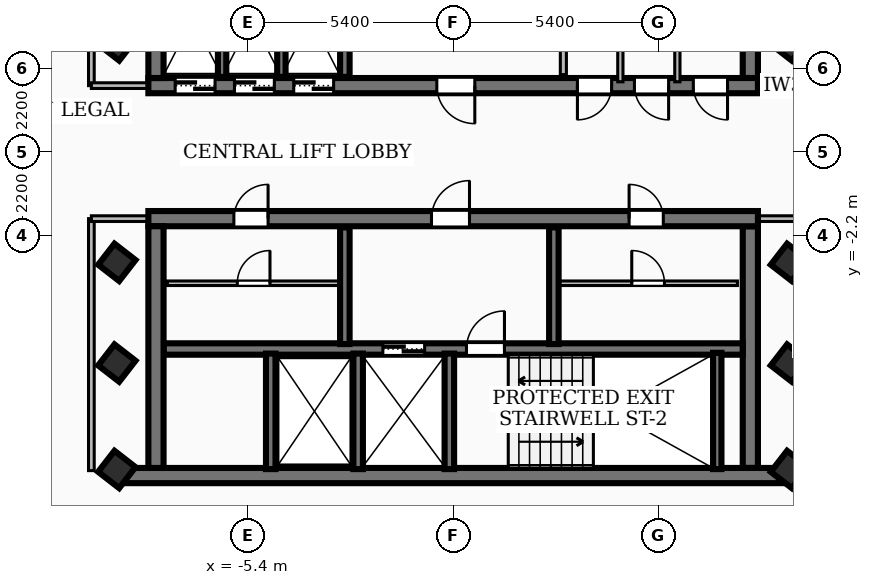
"""IFC4 building model, lengths in metres.
Left out: names, types, materials, properties, quantities, classifications, styles, units other than length and angle.
Written with IfcOpenShell. Run it as: python <this file> out.ifc"""

import sys

from ifc_helpers import new_model, si_unit, direction, frame, frame_2d, origin, origin_2d, place, context, subcontext, project, spatial, rectangle, extrude, element, fill, save


model = new_model("IFC4")
c1 = context("Model", 3, precision=1e-05, world=origin(), true_north=direction((0.0, 1.0)))
c2 = subcontext(c1, "Body", "Model", "MODEL_VIEW")
j1 = project(units=[si_unit("LENGTHUNIT", "METRE"), si_unit("PLANEANGLEUNIT", "RADIAN")], contexts=[c1])
p1 = place(None, origin())
s1 = spatial("IfcSite", under=j1, at=p1, CompositionType="ELEMENT")
p2 = place(p1, origin())
s2 = spatial("IfcBuilding", under=s1, at=p2, CompositionType="ELEMENT")
p3 = place(p2, frame((0.0, 0.0, 261.18)))
s3 = spatial("IfcBuildingStorey", under=s2, at=p3, CompositionType="ELEMENT", Elevation=261.18)
p4 = place(p3, frame((8.02, 1.75, 0.0), z_axis=(0.0, 0.0, 1.0), x_axis=(-1.0, 0.0, 0.0)))
e1 = element("IfcWall", 1, at=p4, inside=s3, PredefinedType="SHEAR", context=c2, shape_type="SweptSolid", body=[
    extrude(rectangle(XDim=16.04, YDim=0.4, at=frame_2d((8.02, 0.0))), origin(), (0.0, 0.0, 1.0), 3.16),
])
p5 = place(p4, frame((7.45, 0.0, 0.0)))
e2 = element("IfcOpeningElement", 2, at=p5, cuts=e1, PredefinedType="OPENING", context=c2, shape_type="SweptSolid", body=[
    extrude(rectangle(XDim=1.0, YDim=2.1, at=frame_2d((0.5, 1.05))), frame((0.0, 0.21, 0.0), z_axis=(0.0, -1.0, 0.0), x_axis=(1.0, 0.0, 0.0)), (0.0, 0.0, 1.0), 0.42),
])
p6 = place(p4, frame((14.285, 0.0, 0.0)))
e3 = element("IfcOpeningElement", 3, at=p6, cuts=e1, PredefinedType="OPENING", context=c2, shape_type="SweptSolid", body=[
    extrude(rectangle(XDim=1.05, YDim=2.15, at=frame_2d((0.525, 1.075))), frame((0.0, 0.21, 0.0), z_axis=(0.0, -1.0, 0.0), x_axis=(1.0, 0.0, 0.0)), (0.0, 0.0, 1.0), 0.42),
])
p7 = place(p4, frame((12.725, 0.0, 0.0)))
e4 = element("IfcOpeningElement", 4, at=p7, cuts=e1, PredefinedType="OPENING", context=c2, shape_type="SweptSolid", body=[
    extrude(rectangle(XDim=1.05, YDim=2.15, at=frame_2d((0.525, 1.075))), frame((0.0, 0.21, 0.0), z_axis=(0.0, -1.0, 0.0), x_axis=(1.0, 0.0, 0.0)), (0.0, 0.0, 1.0), 0.42),
])
p8 = place(p4, frame((11.165, 0.0, 0.0)))
e5 = element("IfcOpeningElement", 5, at=p8, cuts=e1, PredefinedType="OPENING", context=c2, shape_type="SweptSolid", body=[
    extrude(rectangle(XDim=1.05, YDim=2.15, at=frame_2d((0.525, 1.075))), frame((0.0, 0.21, 0.0), z_axis=(0.0, -1.0, 0.0), x_axis=(1.0, 0.0, 0.0)), (0.0, 0.0, 1.0), 0.42),
])
p9 = place(p4, frame((3.85, 0.0, 0.0)))
e6 = element("IfcOpeningElement", 6, at=p9, cuts=e1, PredefinedType="OPENING", context=c2, shape_type="SweptSolid", body=[
    extrude(rectangle(XDim=0.9, YDim=2.06, at=frame_2d((0.45, 1.03))), frame((0.0, 0.21, 0.0), z_axis=(0.0, -1.0, 0.0), x_axis=(1.0, 0.0, 0.0)), (0.0, 0.0, 1.0), 0.42),
])
p10 = place(p4, frame((2.35, 0.0, 0.0)))
e7 = element("IfcOpeningElement", 7, at=p10, cuts=e1, PredefinedType="OPENING", context=c2, shape_type="SweptSolid", body=[
    extrude(rectangle(XDim=0.9, YDim=2.06, at=frame_2d((0.45, 1.03))), frame((0.0, 0.21, 0.0), z_axis=(0.0, -1.0, 0.0), x_axis=(1.0, 0.0, 0.0)), (0.0, 0.0, 1.0), 0.42),
])
p11 = place(p4, frame((0.8, 0.0, 0.0)))
e8 = element("IfcOpeningElement", 8, at=p11, cuts=e1, PredefinedType="OPENING", context=c2, shape_type="SweptSolid", body=[
    extrude(rectangle(XDim=0.9, YDim=2.06, at=frame_2d((0.45, 1.03))), frame((0.0, 0.21, 0.0), z_axis=(0.0, -1.0, 0.0), x_axis=(1.0, 0.0, 0.0)), (0.0, 0.0, 1.0), 0.42),
])
for number, where, z_axis, x_axis in (
    (9, (-7.82, 1.95, 0.0), (0.0, 0.0, 1.0), (0.0, 1.0, 0.0)),
    (10, (7.82, 8.31, 0.0), (0.0, 0.0, 1.0), (0.0, -1.0, 0.0)),
):
    element("IfcWall", number, at=place(p3, frame(where, z_axis=z_axis, x_axis=x_axis)), inside=s3, PredefinedType="SHEAR", context=c2, shape_type="SweptSolid", body=[
        extrude(rectangle(XDim=6.36, YDim=0.4, at=frame_2d((3.18, 0.0))), origin(), (0.0, 0.0, 1.0), 3.16),
    ])
p12 = place(p3, frame((8.78, -8.51, 0.0), z_axis=(0.0, 0.0, 1.0), x_axis=(-1.0, 0.0, 0.0)))
e11 = element("IfcWall", 11, at=p12, inside=s3, PredefinedType="SHEAR", context=c2, shape_type="SweptSolid", body=[
    extrude(rectangle(XDim=17.56, YDim=0.4, at=frame_2d((8.78, 0.0))), origin(), (0.0, 0.0, 1.0), 3.16),
])
p13 = place(p3, frame((-8.02, -1.75, 0.0), z_axis=(0.0, 0.0, 1.0), x_axis=(1.0, 0.0, 0.0)))
e12 = element("IfcWall", 12, at=p13, inside=s3, PredefinedType="SHEAR", context=c2, shape_type="SweptSolid", body=[
    extrude(rectangle(XDim=16.04, YDim=0.4, at=frame_2d((8.02, 0.0))), origin(), (0.0, 0.0, 1.0), 3.16),
])
p14 = place(p13, frame((7.45, 0.0, 0.0)))
e13 = element("IfcOpeningElement", 13, at=p14, cuts=e12, PredefinedType="OPENING", context=c2, shape_type="SweptSolid", body=[
    extrude(rectangle(XDim=1.0, YDim=2.1, at=frame_2d((0.5, 1.05))), frame((0.0, 0.21, 0.0), z_axis=(0.0, -1.0, 0.0), x_axis=(1.0, 0.0, 0.0)), (0.0, 0.0, 1.0), 0.42),
])
p15 = place(p13, frame((12.65, 0.0, 0.0)))
e14 = element("IfcOpeningElement", 14, at=p15, cuts=e12, PredefinedType="OPENING", context=c2, shape_type="SweptSolid", body=[
    extrude(rectangle(XDim=0.9, YDim=2.06, at=frame_2d((0.45, 1.03))), frame((0.0, 0.21, 0.0), z_axis=(0.0, -1.0, 0.0), x_axis=(1.0, 0.0, 0.0)), (0.0, 0.0, 1.0), 0.42),
])
p16 = place(p13, frame((2.25, 0.0, 0.0)))
e15 = element("IfcOpeningElement", 15, at=p16, cuts=e12, PredefinedType="OPENING", context=c2, shape_type="SweptSolid", body=[
    extrude(rectangle(XDim=0.9, YDim=2.06, at=frame_2d((0.45, 1.03))), frame((0.0, 0.21, 0.0), z_axis=(0.0, -1.0, 0.0), x_axis=(1.0, 0.0, 0.0)), (0.0, 0.0, 1.0), 0.42),
])
for number, where, z_axis, x_axis in (
    (16, (-7.82, -8.31, 0.0), (0.0, 0.0, 1.0), (0.0, 1.0, 0.0)),
    (17, (7.82, -1.95, 0.0), (0.0, 0.0, 1.0), (0.0, -1.0, 0.0)),
):
    element("IfcWall", number, at=place(p3, frame(where, z_axis=z_axis, x_axis=x_axis)), inside=s3, PredefinedType="SHEAR", context=c2, shape_type="SweptSolid", body=[
        extrude(rectangle(XDim=6.36, YDim=0.4, at=frame_2d((3.18, 0.0))), origin(), (0.0, 0.0, 1.0), 3.16),
    ])
p17 = place(p3, frame((-7.62, -5.18, 0.0), z_axis=(0.0, 0.0, 1.0), x_axis=(1.0, 0.0, 0.0)))
e18 = element("IfcWall", 18, at=p17, inside=s3, PredefinedType="SOLIDWALL", context=c2, shape_type="SweptSolid", body=[
    extrude(rectangle(XDim=15.24, YDim=0.3, at=frame_2d((7.62, 0.0))), origin(), (0.0, 0.0, 1.0), 3.16),
])
p18 = place(p17, frame((5.77, 0.0, 0.0)))
e19 = element("IfcOpeningElement", 19, at=p18, cuts=e18, PredefinedType="OPENING", context=c2, shape_type="SweptSolid", body=[
    extrude(rectangle(XDim=1.1, YDim=2.15, at=frame_2d((0.55, 1.075))), frame((0.0, 0.16, 0.0), z_axis=(0.0, -1.0, 0.0), x_axis=(1.0, 0.0, 0.0)), (0.0, 0.0, 1.0), 0.32),
])
p19 = place(p17, frame((7.97, 0.0, 0.0)))
e20 = element("IfcOpeningElement", 20, at=p19, cuts=e18, PredefinedType="OPENING", context=c2, shape_type="SweptSolid", body=[
    extrude(rectangle(XDim=1.0, YDim=2.1, at=frame_2d((0.5, 1.05))), frame((0.0, 0.16, 0.0), z_axis=(0.0, -1.0, 0.0), x_axis=(1.0, 0.0, 0.0)), (0.0, 0.0, 1.0), 0.32),
])
p20 = place(p3, frame((6.95, -8.34, 0.0), z_axis=(0.0, 0.0, 1.0), x_axis=(0.0, 1.0, 0.0)))
e21 = element("IfcWall", 21, at=p20, inside=s3, PredefinedType="SOLIDWALL", context=c2, shape_type="SweptSolid", body=[
    extrude(rectangle(XDim=3.06, YDim=0.22, at=frame_2d((1.53, 0.0))), origin(), (0.0, 0.0, 1.0), 3.16),
])
p21 = place(p3, frame((-2.85, 1.98, 0.0), z_axis=(0.0, 0.0, 1.0), x_axis=(0.0, 1.0, 0.0)))
e22 = element("IfcWall", 22, at=p21, inside=s3, PredefinedType="SOLIDWALL", context=c2, shape_type="SweptSolid", body=[
    extrude(rectangle(XDim=3.07, YDim=0.25, at=frame_2d((1.535, 0.0))), origin(), (0.0, 0.0, 1.0), 3.16),
])
for number, where, z_axis, x_axis in (
    (23, (-0.1, -8.34, 0.0), (0.0, 0.0, 1.0), (0.0, 1.0, 0.0)),
    (24, (-2.5, -8.34, 0.0), (0.0, 0.0, 1.0), (0.0, 1.0, 0.0)),
    (25, (-4.8, -8.34, 0.0), (0.0, 0.0, 1.0), (0.0, 1.0, 0.0)),
):
    element("IfcWall", number, at=place(p3, frame(where, z_axis=z_axis, x_axis=x_axis)), inside=s3, PredefinedType="SOLIDWALL", context=c2, shape_type="SweptSolid", body=[
        extrude(rectangle(XDim=3.04, YDim=0.25, at=frame_2d((1.52, 0.0))), origin(), (0.0, 0.0, 1.0), 3.16),
    ])
for number, where, z_axis, x_axis in (
    (26, (-2.85, -5.05, 0.0), (0.0, 0.0, 1.0), (0.0, 1.0, 0.0)),
    (27, (2.65, -5.05, 0.0), (0.0, 0.0, 1.0), (0.0, 1.0, 0.0)),
):
    element("IfcWall", number, at=place(p3, frame(where, z_axis=z_axis, x_axis=x_axis)), inside=s3, PredefinedType="SOLIDWALL", context=c2, shape_type="SweptSolid", body=[
        extrude(rectangle(XDim=3.07, YDim=0.25, at=frame_2d((1.535, 0.0))), origin(), (0.0, 0.0, 1.0), 3.16),
    ])
for number, where, z_axis, x_axis in (
    (28, (-6.08, 1.98, 0.0), (0.0, 0.0, 1.0), (0.0, 1.0, 0.0)),
    (29, (-4.52, 1.98, 0.0), (0.0, 0.0, 1.0), (0.0, 1.0, 0.0)),
):
    element("IfcWall", number, at=place(p3, frame(where, z_axis=z_axis, x_axis=x_axis)), inside=s3, PredefinedType="SOLIDWALL", context=c2, shape_type="SweptSolid", body=[
        extrude(rectangle(XDim=3.07, YDim=0.22, at=frame_2d((1.535, 0.0))), origin(), (0.0, 0.0, 1.0), 3.16),
    ])
for number, where, z_axis, x_axis in (
    (30, (-8.85, -5.55, 0.0), (0.0, 0.0, 1.0), (0.613, 0.79, 0.0)),
    (31, (-8.85, -2.9, 0.0), (0.0, 0.0, 1.0), (0.613, 0.79, 0.0)),
    (32, (-8.85, 2.9, 0.0), (0.0, 0.0, 1.0), (0.613, 0.79, 0.0)),
    (33, (8.85, -5.55, 0.0), (0.0, 0.0, 1.0), (0.613, 0.79, 0.0)),
    (34, (8.85, -2.9, 0.0), (0.0, 0.0, 1.0), (0.613, 0.79, 0.0)),
    (35, (8.85, 2.9, 0.0), (0.0, 0.0, 1.0), (0.613, 0.79, 0.0)),
    (36, (8.85, -8.35, 0.0), (0.0, 0.0, 1.0), (0.613, 0.79, 0.0)),
    (37, (-8.85, -8.35, 0.0), (0.0, 0.0, 1.0), (0.613, 0.79, 0.0)),
):
    element("IfcColumn", number, at=place(p3, frame(where, z_axis=z_axis, x_axis=x_axis)), inside=s3, PredefinedType="COLUMN", context=c2, shape_type="SweptSolid", body=[
        extrude(rectangle(XDim=0.7, YDim=0.7, at=origin_2d()), origin(), (0.0, 0.0, 1.0), 3.42),
    ])
p22 = place(p3, frame((1.386, -19.362, 0.0), z_axis=(0.0, 0.0, 1.0), x_axis=(-0.790191227086, 0.612860363081, 0.0)))
e38 = element("IfcWall", 38, at=p22, inside=s3, PredefinedType="SOLIDWALL", context=c2, shape_type="SweptSolid", body=[
    extrude(rectangle(XDim=25.924, YDim=0.2, at=frame_2d((12.962, 0.0))), origin(), (0.0, 0.0, 1.0), 3.16),
])
p23 = place(p22, frame((19.021, 0.0, 0.85)))
e39 = element("IfcOpeningElement", 39, at=p23, cuts=e38, PredefinedType="OPENING", context=c2, shape_type="SweptSolid", body=[
    extrude(rectangle(XDim=2.4, YDim=1.85, at=frame_2d((1.2, 0.925))), frame((0.0, 0.11, 0.0), z_axis=(0.0, -1.0, 0.0), x_axis=(1.0, 0.0, 0.0)), (0.0, 0.0, 1.0), 0.22),
])
p24 = place(p3, frame((2.9, 2.04, 0.0), z_axis=(0.0, 0.0, 1.0), x_axis=(0.0, 1.0, 0.0)))
e40 = element("IfcWall", 40, at=p24, inside=s3, PredefinedType="PARTITIONING", context=c2, shape_type="SweptSolid", body=[
    extrude(rectangle(XDim=2.94, YDim=0.16, at=frame_2d((1.47, 0.0))), origin(), (0.0, 0.0, 1.0), 2.39),
])
p25 = place(p24, frame((1.82, 0.0, 0.0)))
e41 = element("IfcOpeningElement", 41, at=p25, cuts=e40, PredefinedType="OPENING", context=c2, shape_type="SweptSolid", body=[
    extrude(rectangle(XDim=0.9, YDim=2.06, at=frame_2d((0.45, 1.03))), frame((0.0, 0.09, 0.0), z_axis=(0.0, -1.0, 0.0), x_axis=(1.0, 0.0, 0.0)), (0.0, 0.0, 1.0), 0.18),
])
p26 = place(p3, frame((2.8, -3.45, 0.0), z_axis=(0.0, 0.0, 1.0), x_axis=(1.0, 0.0, 0.0)))
e42 = element("IfcWall", 42, at=p26, inside=s3, PredefinedType="PARTITIONING", context=c2, shape_type="SweptSolid", body=[
    extrude(rectangle(XDim=4.68, YDim=0.12, at=frame_2d((2.34, 0.0))), origin(), (0.0, 0.0, 1.0), 3.16),
])
p27 = place(p26, frame((1.9, 0.0, 0.0)))
e43 = element("IfcOpeningElement", 43, at=p27, cuts=e42, PredefinedType="OPENING", context=c2, shape_type="SweptSolid", body=[
    extrude(rectangle(XDim=0.86, YDim=2.04, at=frame_2d((0.43, 1.02))), frame((0.0, 0.07, 0.0), z_axis=(0.0, -1.0, 0.0), x_axis=(1.0, 0.0, 0.0)), (0.0, 0.0, 1.0), 0.14),
])
p28 = place(p3, frame((-7.52, -3.45, 0.0), z_axis=(0.0, 0.0, 1.0), x_axis=(1.0, 0.0, 0.0)))
e44 = element("IfcWall", 44, at=p28, inside=s3, PredefinedType="PARTITIONING", context=c2, shape_type="SweptSolid", body=[
    extrude(rectangle(XDim=4.54, YDim=0.12, at=frame_2d((2.27, 0.0))), origin(), (0.0, 0.0, 1.0), 3.16),
])
p29 = place(p28, frame((1.84, 0.0, 0.0)))
e45 = element("IfcOpeningElement", 45, at=p29, cuts=e44, PredefinedType="OPENING", context=c2, shape_type="SweptSolid", body=[
    extrude(rectangle(XDim=0.86, YDim=2.04, at=frame_2d((0.43, 1.02))), frame((0.0, 0.07, 0.0), z_axis=(0.0, -1.0, 0.0), x_axis=(1.0, 0.0, 0.0)), (0.0, 0.0, 1.0), 0.14),
])
for number, where, z_axis, x_axis in (
    (46, (4.4, 1.85, 0.0), (0.0, 0.0, 1.0), (0.0, 1.0, 0.0)),
    (47, (5.9, 1.85, 0.0), (0.0, 0.0, 1.0), (0.0, 1.0, 0.0)),
):
    element("IfcWall", number, at=place(p3, frame(where, z_axis=z_axis, x_axis=x_axis)), inside=s3, PredefinedType="PARTITIONING", context=c2, shape_type="SweptSolid", body=[
        extrude(rectangle(XDim=1.89, YDim=0.138, at=frame_2d((0.945, 0.0))), origin(), (0.0, 0.0, 1.0), 2.39),
    ])
p30 = place(p3, frame((-9.52, 1.75, 0.0), z_axis=(0.0, 0.0, 1.0), x_axis=(0.0, 1.0, 0.0)))
e48 = element("IfcWall", 48, at=p30, inside=s3, PredefinedType="PARTITIONING", context=c2, shape_type="SweptSolid", body=[
    extrude(rectangle(XDim=6.63, YDim=0.15, at=frame_2d((3.315, 0.0))), origin(), (0.0, 0.0, 1.0), 2.53),
])
p31 = place(p3, frame((-7.85, 1.75, 0.0), z_axis=(0.0, 0.0, 1.0), x_axis=(-1.0, 0.0, 0.0)))
e49 = element("IfcWall", 49, at=p31, inside=s3, PredefinedType="PARTITIONING", context=c2, shape_type="SweptSolid", body=[
    extrude(rectangle(XDim=1.67, YDim=0.15, at=frame_2d((0.835, 0.0))), origin(), (0.0, 0.0, 1.0), 2.39),
])
p32 = place(p3, frame((-9.52, -8.38, 0.0), z_axis=(0.0, 0.0, 1.0), x_axis=(0.0, 1.0, 0.0)))
e50 = element("IfcWall", 50, at=p32, inside=s3, PredefinedType="PARTITIONING", context=c2, shape_type="SweptSolid", body=[
    extrude(rectangle(XDim=6.63, YDim=0.15, at=frame_2d((3.315, 0.0))), origin(), (0.0, 0.0, 1.0), 3.16),
])
for number, where, z_axis, x_axis in (
    (51, (-7.85, -1.75, 0.0), (0.0, 0.0, 1.0), (-1.0, 0.0, 0.0)),
    (52, (7.85, 1.75, 0.0), (0.0, 0.0, 1.0), (1.0, 0.0, 0.0)),
    (53, (7.85, -1.75, 0.0), (0.0, 0.0, 1.0), (1.0, 0.0, 0.0)),
):
    element("IfcWall", number, at=place(p3, frame(where, z_axis=z_axis, x_axis=x_axis)), inside=s3, PredefinedType="PARTITIONING", context=c2, shape_type="SweptSolid", body=[
        extrude(rectangle(XDim=1.67, YDim=0.15, at=frame_2d((0.835, 0.0))), origin(), (0.0, 0.0, 1.0), 2.39),
    ])
p33 = place(p3, frame((-17.555, 0.683, 0.0), z_axis=(0.0, 0.0, 1.0), x_axis=(0.61291959311, 0.790145285617, 0.0)))
e54 = element("IfcWall", 54, at=p33, inside=s3, PredefinedType="PARTITIONING", context=c2, shape_type="SweptSolid", body=[
    extrude(rectangle(XDim=20.239, YDim=0.12, at=frame_2d((10.12, 0.0))), origin(), (0.0, 0.0, 1.0), 2.53),
])
p34 = place(p33, frame((9.96, 0.0, 0.0)))
e55 = element("IfcOpeningElement", 55, at=p34, cuts=e54, PredefinedType="OPENING", context=c2, shape_type="SweptSolid", body=[
    extrude(rectangle(XDim=0.86, YDim=2.04, at=frame_2d((0.43, 1.02))), frame((0.0, 0.07, 0.0), z_axis=(0.0, -1.0, 0.0), x_axis=(1.0, 0.0, 0.0)), (0.0, 0.0, 1.0), 0.14),
])
p35 = place(p33, frame((8.52, 0.0, 0.0)))
e56 = element("IfcOpeningElement", 56, at=p35, cuts=e54, PredefinedType="OPENING", context=c2, shape_type="SweptSolid", body=[
    extrude(rectangle(XDim=0.86, YDim=2.04, at=frame_2d((0.43, 1.02))), frame((0.0, 0.07, 0.0), z_axis=(0.0, -1.0, 0.0), x_axis=(1.0, 0.0, 0.0)), (0.0, 0.0, 1.0), 0.14),
])
p36 = place(p3, frame((17.555, -0.683, 0.0), z_axis=(0.0, 0.0, 1.0), x_axis=(-0.61291959311, -0.790145285617, 0.0)))
e57 = element("IfcWall", 57, at=p36, inside=s3, PredefinedType="PARTITIONING", context=c2, shape_type="SweptSolid", body=[
    extrude(rectangle(XDim=20.239, YDim=0.12, at=frame_2d((10.12, 0.0))), origin(), (0.0, 0.0, 1.0), 2.53),
])
p37 = place(p36, frame((9.96, 0.0, 0.0)))
e58 = element("IfcOpeningElement", 58, at=p37, cuts=e57, PredefinedType="OPENING", context=c2, shape_type="SweptSolid", body=[
    extrude(rectangle(XDim=0.86, YDim=2.04, at=frame_2d((0.43, 1.02))), frame((0.0, 0.07, 0.0), z_axis=(0.0, -1.0, 0.0), x_axis=(1.0, 0.0, 0.0)), (0.0, 0.0, 1.0), 0.14),
])
p38 = place(p36, frame((8.52, 0.0, 0.0)))
e59 = element("IfcOpeningElement", 59, at=p38, cuts=e57, PredefinedType="OPENING", context=c2, shape_type="SweptSolid", body=[
    extrude(rectangle(XDim=0.86, YDim=2.04, at=frame_2d((0.43, 1.02))), frame((0.0, 0.07, 0.0), z_axis=(0.0, -1.0, 0.0), x_axis=(1.0, 0.0, 0.0)), (0.0, 0.0, 1.0), 0.14),
])
p39 = place(p5, origin())
e60 = element("IfcDoor", 60, at=p39, inside=s3, OperationType="SINGLE_SWING_LEFT", PredefinedType="DOOR", context=c2, shape_type="SweptSolid", body=[
    extrude(rectangle(XDim=1.0, YDim=2.1, at=frame_2d((0.5, 1.05))), frame((0.0, 0.025, 0.0), z_axis=(0.0, -1.0, 0.0), x_axis=(1.0, 0.0, 0.0)), (0.0, 0.0, 1.0), 0.05),
])
fill(e2, e60)
p40 = place(p14, origin())
e61 = element("IfcDoor", 61, at=p40, inside=s3, OperationType="SINGLE_SWING_RIGHT", PredefinedType="DOOR", context=c2, shape_type="SweptSolid", body=[
    extrude(rectangle(XDim=1.0, YDim=2.1, at=frame_2d((0.5, 1.05))), frame((0.0, 0.025, 0.0), z_axis=(0.0, -1.0, 0.0), x_axis=(1.0, 0.0, 0.0)), (0.0, 0.0, 1.0), 0.05),
])
fill(e13, e61)
p41 = place(p18, origin())
e62 = element("IfcDoor", 62, at=p41, inside=s3, OperationType="DOUBLE_DOOR_SLIDING", PredefinedType="DOOR", context=c2, shape_type="SweptSolid", body=[
    extrude(rectangle(XDim=1.1, YDim=2.15, at=frame_2d((0.55, 1.075))), frame((0.0, 0.025, 0.0), z_axis=(0.0, -1.0, 0.0), x_axis=(1.0, 0.0, 0.0)), (0.0, 0.0, 1.0), 0.05),
])
fill(e19, e62)
p42 = place(p19, origin())
e63 = element("IfcDoor", 63, at=p42, inside=s3, OperationType="SINGLE_SWING_RIGHT", PredefinedType="DOOR", context=c2, shape_type="SweptSolid", body=[
    extrude(rectangle(XDim=1.0, YDim=2.1, at=frame_2d((0.5, 1.05))), frame((0.0, 0.025, 0.0), z_axis=(0.0, -1.0, 0.0), x_axis=(1.0, 0.0, 0.0)), (0.0, 0.0, 1.0), 0.05),
])
fill(e20, e63)
p43 = place(p6, origin())
e64 = element("IfcDoor", 64, at=p43, inside=s3, OperationType="DOUBLE_DOOR_SLIDING", PredefinedType="DOOR", context=c2, shape_type="SweptSolid", body=[
    extrude(rectangle(XDim=1.05, YDim=2.15, at=frame_2d((0.525, 1.075))), frame((0.0, 0.025, 0.0), z_axis=(0.0, -1.0, 0.0), x_axis=(1.0, 0.0, 0.0)), (0.0, 0.0, 1.0), 0.05),
])
fill(e3, e64)
p44 = place(p7, origin())
e65 = element("IfcDoor", 65, at=p44, inside=s3, OperationType="DOUBLE_DOOR_SLIDING", PredefinedType="DOOR", context=c2, shape_type="SweptSolid", body=[
    extrude(rectangle(XDim=1.05, YDim=2.15, at=frame_2d((0.525, 1.075))), frame((0.0, 0.025, 0.0), z_axis=(0.0, -1.0, 0.0), x_axis=(1.0, 0.0, 0.0)), (0.0, 0.0, 1.0), 0.05),
])
fill(e4, e65)
p45 = place(p8, origin())
e66 = element("IfcDoor", 66, at=p45, inside=s3, OperationType="DOUBLE_DOOR_SLIDING", PredefinedType="DOOR", context=c2, shape_type="SweptSolid", body=[
    extrude(rectangle(XDim=1.05, YDim=2.15, at=frame_2d((0.525, 1.075))), frame((0.0, 0.025, 0.0), z_axis=(0.0, -1.0, 0.0), x_axis=(1.0, 0.0, 0.0)), (0.0, 0.0, 1.0), 0.05),
])
fill(e5, e66)
p46 = place(p15, origin())
e67 = element("IfcDoor", 67, at=p46, inside=s3, OperationType="SINGLE_SWING_LEFT", PredefinedType="DOOR", context=c2, shape_type="SweptSolid", body=[
    extrude(rectangle(XDim=0.9, YDim=2.06, at=frame_2d((0.45, 1.03))), frame((0.0, 0.025, 0.0), z_axis=(0.0, -1.0, 0.0), x_axis=(1.0, 0.0, 0.0)), (0.0, 0.0, 1.0), 0.05),
])
fill(e14, e67)
p47 = place(p16, origin())
e68 = element("IfcDoor", 68, at=p47, inside=s3, OperationType="SINGLE_SWING_RIGHT", PredefinedType="DOOR", context=c2, shape_type="SweptSolid", body=[
    extrude(rectangle(XDim=0.9, YDim=2.06, at=frame_2d((0.45, 1.03))), frame((0.0, 0.025, 0.0), z_axis=(0.0, -1.0, 0.0), x_axis=(1.0, 0.0, 0.0)), (0.0, 0.0, 1.0), 0.05),
])
fill(e15, e68)
p48 = place(p9, origin())
e69 = element("IfcDoor", 69, at=p48, inside=s3, OperationType="SINGLE_SWING_RIGHT", PredefinedType="DOOR", context=c2, shape_type="SweptSolid", body=[
    extrude(rectangle(XDim=0.9, YDim=2.06, at=frame_2d((0.45, 1.03))), frame((0.0, 0.025, 0.0), z_axis=(0.0, -1.0, 0.0), x_axis=(1.0, 0.0, 0.0)), (0.0, 0.0, 1.0), 0.05),
])
fill(e6, e69)
p49 = place(p10, origin())
e70 = element("IfcDoor", 70, at=p49, inside=s3, OperationType="SINGLE_SWING_LEFT", PredefinedType="DOOR", context=c2, shape_type="SweptSolid", body=[
    extrude(rectangle(XDim=0.9, YDim=2.06, at=frame_2d((0.45, 1.03))), frame((0.0, 0.025, 0.0), z_axis=(0.0, -1.0, 0.0), x_axis=(1.0, 0.0, 0.0)), (0.0, 0.0, 1.0), 0.05),
])
fill(e7, e70)
p50 = place(p11, origin())
e71 = element("IfcDoor", 71, at=p50, inside=s3, OperationType="SINGLE_SWING_LEFT", PredefinedType="DOOR", context=c2, shape_type="SweptSolid", body=[
    extrude(rectangle(XDim=0.9, YDim=2.06, at=frame_2d((0.45, 1.03))), frame((0.0, 0.025, 0.0), z_axis=(0.0, -1.0, 0.0), x_axis=(1.0, 0.0, 0.0)), (0.0, 0.0, 1.0), 0.05),
])
fill(e8, e71)
p51 = place(p27, origin())
e72 = element("IfcDoor", 72, at=p51, inside=s3, OperationType="SINGLE_SWING_LEFT", PredefinedType="DOOR", context=c2, shape_type="SweptSolid", body=[
    extrude(rectangle(XDim=0.86, YDim=2.04, at=frame_2d((0.43, 1.02))), frame((0.0, 0.025, 0.0), z_axis=(0.0, -1.0, 0.0), x_axis=(1.0, 0.0, 0.0)), (0.0, 0.0, 1.0), 0.05),
])
fill(e43, e72)
p52 = place(p29, origin())
e73 = element("IfcDoor", 73, at=p52, inside=s3, OperationType="SINGLE_SWING_RIGHT", PredefinedType="DOOR", context=c2, shape_type="SweptSolid", body=[
    extrude(rectangle(XDim=0.86, YDim=2.04, at=frame_2d((0.43, 1.02))), frame((0.0, 0.025, 0.0), z_axis=(0.0, -1.0, 0.0), x_axis=(1.0, 0.0, 0.0)), (0.0, 0.0, 1.0), 0.05),
])
fill(e45, e73)
save(model, sys.argv[1])
